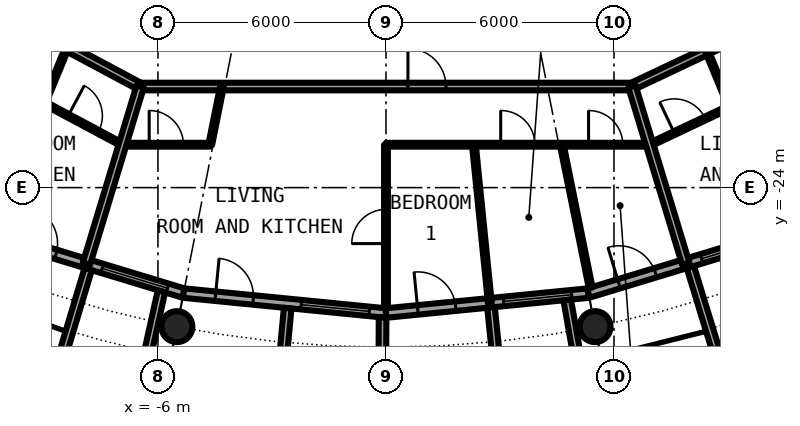
"""IFC4 building model, lengths in metres.
Left out: names, types, materials, properties, quantities, classifications, styles, units other than length and angle.
Written with IfcOpenShell. Run it as: python <this file> out.ifc"""

import sys

from ifc_helpers import new_model, si_unit, direction, frame, frame_2d, origin, origin_2d, place, context, subcontext, project, spatial, rectangle, circle, hollow_circle, extrude, element, fill, save


model = new_model("IFC4")
c1 = context("Model", 3, precision=1e-05, world=origin(), true_north=direction((0.0, 1.0)))
c2 = subcontext(c1, "Body", "Model", "MODEL_VIEW")
j1 = project(units=[si_unit("LENGTHUNIT", "METRE"), si_unit("PLANEANGLEUNIT", "RADIAN")], contexts=[c1])
p1 = place(None, origin())
s1 = spatial("IfcSite", under=j1, at=p1, CompositionType="ELEMENT")
p2 = place(p1, origin())
s2 = spatial("IfcBuilding", under=s1, at=p2, CompositionType="ELEMENT")
p3 = place(p2, frame((0.0, 0.0, 218.8)))
s3 = spatial("IfcBuildingStorey", under=s2, at=p3, CompositionType="ELEMENT", Elevation=218.8)
for number, where, z_axis, x_axis in (
    (1, (-5.501, -27.658, 0.0), (0.0, 0.0, 1.0), (1.0, 0.0, 0.0)),
    (2, (5.501, -27.658, 0.0), (0.0, 0.0, 1.0), (1.0, 0.0, 0.0)),
):
    element("IfcColumn", number, at=place(p3, frame(where, z_axis=z_axis, x_axis=x_axis)), inside=s3, PredefinedType="COLUMN", context=c2, shape_type="SweptSolid", body=[
        extrude(hollow_circle(Radius=0.406, WallThickness=0.03, at=origin_2d()), origin(), (0.0, 0.0, 1.0), 3.05),
    ])
p4 = place(p3, frame((-10.447, -25.222, 0.0), z_axis=(0.0, 0.0, 1.0), x_axis=(0.956965678721, -0.290201119486, 0.0)))
e3 = element("IfcWall", 3, at=p4, inside=s3, PredefinedType="SOLIDWALL", context=c2, shape_type="SweptSolid", body=[
    extrude(rectangle(XDim=5.351, YDim=0.25, at=frame_2d((2.676, 0.0))), origin(), (0.0, 0.0, 1.0), 2.65),
])
p5 = place(p4, frame((0.841, 0.0, 0.0)))
e4 = element("IfcOpeningElement", 4, at=p5, cuts=e3, PredefinedType="OPENING", context=c2, shape_type="SweptSolid", body=[
    extrude(rectangle(XDim=1.0, YDim=2.2, at=frame_2d((0.5, 1.1))), frame((0.0, 0.135, 0.0), z_axis=(0.0, -1.0, 0.0), x_axis=(1.0, 0.0, 0.0)), (0.0, 0.0, 1.0), 0.27),
])
p6 = place(p4, frame((3.111, 0.0, 0.3)))
e5 = element("IfcOpeningElement", 5, at=p6, cuts=e3, PredefinedType="OPENING", context=c2, shape_type="SweptSolid", body=[
    extrude(rectangle(XDim=1.8, YDim=2.1, at=frame_2d((0.9, 1.05))), frame((0.0, 0.135, 0.0), z_axis=(0.0, -1.0, 0.0), x_axis=(1.0, 0.0, 0.0)), (0.0, 0.0, 1.0), 0.27),
])
p7 = place(p3, frame((-7.837, -26.144, -0.03), z_axis=(0.0, 0.0, 1.0), x_axis=(-0.287064767992, -0.957911174889, 0.0)))
e6 = element("IfcWall", 6, at=p7, inside=s3, PredefinedType="SOLIDWALL", context=c2, shape_type="SweptSolid", body=[
    extrude(rectangle(XDim=3.006, YDim=0.2, at=frame_2d((1.503, 0.0))), origin(), (0.0, 0.0, 1.0), 2.68),
])
p8 = place(p3, frame((-5.909, -26.729, -0.03), z_axis=(0.0, 0.0, 1.0), x_axis=(-0.216409053917, -0.976302781612, 0.0)))
e7 = element("IfcWall", 7, at=p8, inside=s3, PredefinedType="SOLIDWALL", context=c2, shape_type="SweptSolid", body=[
    extrude(rectangle(XDim=2.925, YDim=0.2, at=frame_2d((1.463, 0.0))), origin(), (0.0, 0.0, 1.0), 2.68),
])
p9 = place(p3, frame((-5.326, -26.775, 0.0), z_axis=(0.0, 0.0, 1.0), x_axis=(0.995173996315, -0.098126026407, 0.0)))
e8 = element("IfcWall", 8, at=p9, inside=s3, PredefinedType="SOLIDWALL", context=c2, shape_type="SweptSolid", body=[
    extrude(rectangle(XDim=5.352, YDim=0.25, at=frame_2d((2.676, 0.0))), origin(), (0.0, 0.0, 1.0), 2.65),
])
p10 = place(p9, frame((0.841, 0.0, 0.0)))
e9 = element("IfcOpeningElement", 9, at=p10, cuts=e8, PredefinedType="OPENING", context=c2, shape_type="SweptSolid", body=[
    extrude(rectangle(XDim=1.0, YDim=2.2, at=frame_2d((0.5, 1.1))), frame((0.0, 0.135, 0.0), z_axis=(0.0, -1.0, 0.0), x_axis=(1.0, 0.0, 0.0)), (0.0, 0.0, 1.0), 0.27),
])
p11 = place(p9, frame((3.111, 0.0, 0.3)))
e10 = element("IfcOpeningElement", 10, at=p11, cuts=e8, PredefinedType="OPENING", context=c2, shape_type="SweptSolid", body=[
    extrude(rectangle(XDim=1.8, YDim=2.1, at=frame_2d((0.9, 1.05))), frame((0.0, 0.135, 0.0), z_axis=(0.0, -1.0, 0.0), x_axis=(1.0, 0.0, 0.0)), (0.0, 0.0, 1.0), 0.27),
])
p12 = place(p3, frame((-2.586, -27.171, -0.03), z_axis=(0.0, 0.0, 1.0), x_axis=(-0.094548432284, -0.995520262954, 0.0)))
e11 = element("IfcWall", 11, at=p12, inside=s3, PredefinedType="SOLIDWALL", context=c2, shape_type="SweptSolid", body=[
    extrude(rectangle(XDim=3.006, YDim=0.2, at=frame_2d((1.503, 0.0))), origin(), (0.0, 0.0, 1.0), 2.68),
])
p13 = place(p3, frame((-0.09, -27.417, -0.03), z_axis=(0.0, 0.0, 1.0), x_axis=(-0.00347308367, -0.999993968827, 0.0)))
e12 = element("IfcWall", 12, at=p13, inside=s3, PredefinedType="SOLIDWALL", context=c2, shape_type="SweptSolid", body=[
    extrude(rectangle(XDim=2.882, YDim=0.2, at=frame_2d((1.441, 0.0))), origin(), (0.0, 0.0, 1.0), 2.68),
])
p14 = place(p3, frame((0.0, -27.3, 0.0), z_axis=(0.0, 0.0, 1.0), x_axis=(0.995173996315, 0.098126026407, 0.0)))
e13 = element("IfcWall", 13, at=p14, inside=s3, PredefinedType="SOLIDWALL", context=c2, shape_type="SweptSolid", body=[
    extrude(rectangle(XDim=5.352, YDim=0.25, at=frame_2d((2.676, 0.0))), origin(), (0.0, 0.0, 1.0), 2.65),
])
p15 = place(p14, frame((0.841, 0.0, 0.0)))
e14 = element("IfcOpeningElement", 14, at=p15, cuts=e13, PredefinedType="OPENING", context=c2, shape_type="SweptSolid", body=[
    extrude(rectangle(XDim=1.0, YDim=2.2, at=frame_2d((0.5, 1.1))), frame((0.0, 0.135, 0.0), z_axis=(0.0, -1.0, 0.0), x_axis=(1.0, 0.0, 0.0)), (0.0, 0.0, 1.0), 0.27),
])
p16 = place(p14, frame((3.111, 0.0, 0.3)))
e15 = element("IfcOpeningElement", 15, at=p16, cuts=e13, PredefinedType="OPENING", context=c2, shape_type="SweptSolid", body=[
    extrude(rectangle(XDim=1.8, YDim=2.1, at=frame_2d((0.9, 1.05))), frame((0.0, 0.135, 0.0), z_axis=(0.0, -1.0, 0.0), x_axis=(1.0, 0.0, 0.0)), (0.0, 0.0, 1.0), 0.27),
])
p17 = place(p3, frame((2.764, -27.153, -0.03), z_axis=(0.0, 0.0, 1.0), x_axis=(0.101505487237, -0.994834979311, 0.0)))
e16 = element("IfcWall", 16, at=p17, inside=s3, PredefinedType="SOLIDWALL", context=c2, shape_type="SweptSolid", body=[
    extrude(rectangle(XDim=3.007, YDim=0.2, at=frame_2d((1.503, 0.0))), origin(), (0.0, 0.0, 1.0), 2.68),
])
p18 = place(p3, frame((4.769, -26.956, -0.03), z_axis=(0.0, 0.0, 1.0), x_axis=(0.174056778901, -0.984735618183, 0.0)))
e17 = element("IfcWall", 17, at=p18, inside=s3, PredefinedType="SOLIDWALL", context=c2, shape_type="SweptSolid", body=[
    extrude(rectangle(XDim=2.925, YDim=0.2, at=frame_2d((1.462, 0.0))), origin(), (0.0, 0.0, 1.0), 2.68),
])
p19 = place(p3, frame((5.326, -26.775, 0.0), z_axis=(0.0, 0.0, 1.0), x_axis=(0.956965678721, 0.290201119486, 0.0)))
e18 = element("IfcWall", 18, at=p19, inside=s3, PredefinedType="SOLIDWALL", context=c2, shape_type="SweptSolid", body=[
    extrude(rectangle(XDim=5.351, YDim=0.25, at=frame_2d((2.676, 0.0))), origin(), (0.0, 0.0, 1.0), 2.65),
])
p20 = place(p19, frame((0.841, 0.0, 0.0)))
e19 = element("IfcOpeningElement", 19, at=p20, cuts=e18, PredefinedType="OPENING", context=c2, shape_type="SweptSolid", body=[
    extrude(rectangle(XDim=1.0, YDim=2.2, at=frame_2d((0.5, 1.1))), frame((0.0, 0.135, 0.0), z_axis=(0.0, -1.0, 0.0), x_axis=(1.0, 0.0, 0.0)), (0.0, 0.0, 1.0), 0.27),
])
p21 = place(p19, frame((3.111, 0.0, 0.3)))
e20 = element("IfcOpeningElement", 20, at=p21, cuts=e18, PredefinedType="OPENING", context=c2, shape_type="SweptSolid", body=[
    extrude(rectangle(XDim=1.8, YDim=2.1, at=frame_2d((0.9, 1.05))), frame((0.0, 0.135, 0.0), z_axis=(0.0, -1.0, 0.0), x_axis=(1.0, 0.0, 0.0)), (0.0, 0.0, 1.0), 0.27),
])
p22 = place(p3, frame((8.82, -29.093, -0.03), z_axis=(0.0, 0.0, 1.0), x_axis=(0.941461077774, 0.337121697664, 0.0)))
e21 = element("IfcWall", 21, at=p22, inside=s3, PredefinedType="SOLIDWALL", context=c2, shape_type="SweptSolid", body=[
    extrude(rectangle(XDim=2.993, YDim=0.2, at=frame_2d((1.497, 0.0))), origin(), (0.0, 0.0, 1.0), 2.68),
])
p23 = place(p22, frame((0.457, 0.0, 0.33)))
e22 = element("IfcOpeningElement", 22, at=p23, cuts=e21, PredefinedType="OPENING", context=c2, shape_type="SweptSolid", body=[
    extrude(circle(Radius=1.04, at=frame_2d((1.04, 1.04))), frame((0.0, 0.11, 0.0), z_axis=(0.0, -1.0, 0.0), x_axis=(1.0, 0.0, 0.0)), (0.0, 0.0, 1.0), 0.22),
])
p24 = place(p3, frame((8.009, -26.092, -0.03), z_axis=(0.0, 0.0, 1.0), x_axis=(0.293406695073, -0.955987715029, 0.0)))
e23 = element("IfcWall", 23, at=p24, inside=s3, PredefinedType="SOLIDWALL", context=c2, shape_type="SweptSolid", body=[
    extrude(rectangle(XDim=3.006, YDim=0.2, at=frame_2d((1.503, 0.0))), origin(), (0.0, 0.0, 1.0), 2.68),
])
p25 = place(p3, frame((6.939, -22.872, 0.0), z_axis=(0.0, 0.0, 1.0), x_axis=(0.903888765148, 0.427767577359, 0.0)))
e24 = element("IfcWall", 24, at=p25, inside=s3, PredefinedType="PARTITIONING", context=c2, shape_type="SweptSolid", body=[
    extrude(rectangle(XDim=2.338, YDim=0.1, at=frame_2d((1.169, 0.0))), origin(), (0.0, 0.0, 1.0), 2.65),
])
p26 = place(p25, frame((0.718, 0.0, 0.0)))
e25 = element("IfcOpeningElement", 25, at=p26, cuts=e24, PredefinedType="OPENING", context=c2, shape_type="SweptSolid", body=[
    extrude(rectangle(XDim=0.9, YDim=2.3, at=frame_2d((0.45, 1.15))), frame((0.0, 0.06, 0.0), z_axis=(0.0, -1.0, 0.0), x_axis=(1.0, 0.0, 0.0)), (0.0, 0.0, 1.0), 0.12),
])
p27 = place(p3, frame((-8.994, -21.772, 0.0), z_axis=(0.0, 0.0, 1.0), x_axis=(0.881882873346, -0.471468554305, 0.0)))
e26 = element("IfcWall", 26, at=p27, inside=s3, PredefinedType="PARTITIONING", context=c2, shape_type="SweptSolid", body=[
    extrude(rectangle(XDim=2.331, YDim=0.1, at=frame_2d((1.166, 0.0))), origin(), (0.0, 0.0, 1.0), 2.65),
])
p28 = place(p27, frame((0.716, 0.0, 0.0)))
e27 = element("IfcOpeningElement", 27, at=p28, cuts=e26, PredefinedType="OPENING", context=c2, shape_type="SweptSolid", body=[
    extrude(rectangle(XDim=0.9, YDim=2.3, at=frame_2d((0.45, 1.15))), frame((0.0, 0.06, 0.0), z_axis=(0.0, -1.0, 0.0), x_axis=(1.0, 0.0, 0.0)), (0.0, 0.0, 1.0), 0.12),
])
p29 = place(p3, frame((-6.938, -22.871, 0.0), z_axis=(0.0, 0.0, 1.0), x_axis=(1.0, 0.0, 0.0)))
e28 = element("IfcWall", 28, at=p29, inside=s3, PredefinedType="PARTITIONING", context=c2, shape_type="SweptSolid", body=[
    extrude(rectangle(XDim=2.313, YDim=0.1, at=frame_2d((1.156, 0.0))), origin(), (0.0, 0.0, 1.0), 2.65),
])
p30 = place(p29, frame((0.707, 0.0, 0.0)))
e29 = element("IfcOpeningElement", 29, at=p30, cuts=e28, PredefinedType="OPENING", context=c2, shape_type="SweptSolid", body=[
    extrude(rectangle(XDim=0.9, YDim=2.3, at=frame_2d((0.45, 1.15))), frame((0.0, 0.06, 0.0), z_axis=(0.0, -1.0, 0.0), x_axis=(1.0, 0.0, 0.0)), (0.0, 0.0, 1.0), 0.12),
])
p31 = place(p3, frame((0.0, -22.871, 0.0), z_axis=(0.0, 0.0, 1.0), x_axis=(1.0, 0.0, 0.0)))
e30 = element("IfcWall", 30, at=p31, inside=s3, PredefinedType="PARTITIONING", context=c2, shape_type="SweptSolid", body=[
    extrude(rectangle(XDim=6.938, YDim=0.1, at=frame_2d((3.469, 0.0))), origin(), (0.0, 0.0, 1.0), 2.65),
])
p32 = place(p31, frame((3.019, 0.0, 0.0)))
e31 = element("IfcOpeningElement", 31, at=p32, cuts=e30, PredefinedType="OPENING", context=c2, shape_type="SweptSolid", body=[
    extrude(rectangle(XDim=0.9, YDim=2.3, at=frame_2d((0.45, 1.15))), frame((0.0, 0.06, 0.0), z_axis=(0.0, -1.0, 0.0), x_axis=(1.0, 0.0, 0.0)), (0.0, 0.0, 1.0), 0.12),
])
p33 = place(p31, frame((5.331, 0.0, 0.0)))
e32 = element("IfcOpeningElement", 32, at=p33, cuts=e30, PredefinedType="OPENING", context=c2, shape_type="SweptSolid", body=[
    extrude(rectangle(XDim=0.9, YDim=2.3, at=frame_2d((0.45, 1.15))), frame((0.0, 0.06, 0.0), z_axis=(0.0, -1.0, 0.0), x_axis=(1.0, 0.0, 0.0)), (0.0, 0.0, 1.0), 0.12),
])
p34 = place(p3, frame((6.469, -21.342, 0.0), z_axis=(0.0, 0.0, 1.0), x_axis=(0.90398136628, 0.427571852931, 0.0)))
e33 = element("IfcWall", 33, at=p34, inside=s3, PredefinedType="PARTITIONING", context=c2, shape_type="SweptSolid", body=[
    extrude(rectangle(XDim=6.549, YDim=0.2, at=frame_2d((3.274, 0.0))), origin(), (0.0, 0.0, 1.0), 2.65),
])
p35 = place(p34, frame((3.867, 0.0, 0.0)))
e34 = element("IfcOpeningElement", 34, at=p35, cuts=e33, PredefinedType="OPENING", context=c2, shape_type="SweptSolid", body=[
    extrude(rectangle(XDim=1.0, YDim=2.3, at=frame_2d((0.5, 1.15))), frame((0.0, 0.11, 0.0), z_axis=(0.0, -1.0, 0.0), x_axis=(1.0, 0.0, 0.0)), (0.0, 0.0, 1.0), 0.22),
])
p36 = place(p3, frame((-14.147, -17.238, 0.0), z_axis=(0.0, 0.0, 1.0), x_axis=(0.881941116964, -0.471359593312, 0.0)))
e35 = element("IfcWall", 35, at=p36, inside=s3, PredefinedType="PARTITIONING", context=c2, shape_type="SweptSolid", body=[
    extrude(rectangle(XDim=8.705, YDim=0.2, at=frame_2d((4.352, 0.0))), origin(), (0.0, 0.0, 1.0), 2.65),
])
p37 = place(p36, frame((2.763, 0.0, 0.0)))
e36 = element("IfcOpeningElement", 36, at=p37, cuts=e35, PredefinedType="OPENING", context=c2, shape_type="SweptSolid", body=[
    extrude(rectangle(XDim=1.0, YDim=2.3, at=frame_2d((0.5, 1.15))), frame((0.0, 0.11, 0.0), z_axis=(0.0, -1.0, 0.0), x_axis=(1.0, 0.0, 0.0)), (0.0, 0.0, 1.0), 0.22),
])
p38 = place(p3, frame((-6.473, -21.34, 0.0), z_axis=(0.0, 0.0, 1.0), x_axis=(1.0, 0.0, 0.0)))
e37 = element("IfcWall", 37, at=p38, inside=s3, PredefinedType="PARTITIONING", context=c2, shape_type="SweptSolid", body=[
    extrude(rectangle(XDim=12.946, YDim=0.2, at=frame_2d((6.473, 0.0))), origin(), (0.0, 0.0, 1.0), 2.65),
])
p39 = place(p38, frame((7.051, 0.0, 0.0)))
e38 = element("IfcOpeningElement", 38, at=p39, cuts=e37, PredefinedType="OPENING", context=c2, shape_type="SweptSolid", body=[
    extrude(rectangle(XDim=1.0, YDim=2.3, at=frame_2d((0.5, 1.15))), frame((0.0, 0.11, 0.0), z_axis=(0.0, -1.0, 0.0), x_axis=(1.0, 0.0, 0.0)), (0.0, 0.0, 1.0), 0.22),
])
p40 = place(p3, frame((6.473, -21.34, 0.0), z_axis=(0.0, 0.0, 1.0), x_axis=(0.290705166682, -0.956812680761, 0.0)))
e39 = element("IfcWall", 39, at=p40, inside=s3, PredefinedType="PARTITIONING", context=c2, shape_type="SweptSolid", body=[
    extrude(rectangle(XDim=4.874, YDim=0.2, at=frame_2d((2.437, 0.0))), origin(), (0.0, 0.0, 1.0), 2.65),
])
p41 = place(p3, frame((-8.994, -21.772, 0.0), z_axis=(0.0, 0.0, 1.0), x_axis=(0.381535938362, 0.924354005638, 0.0)))
e40 = element("IfcWall", 40, at=p41, inside=s3, PredefinedType="PARTITIONING", context=c2, shape_type="SweptSolid", body=[
    extrude(rectangle(XDim=1.577, YDim=0.1, at=frame_2d((0.789, 0.0))), origin(), (0.0, 0.0, 1.0), 2.65),
])
p42 = place(p3, frame((-7.883, -26.006, 0.0), z_axis=(0.0, 0.0, 1.0), x_axis=(0.290085236897, 0.957000812609, 0.0)))
e41 = element("IfcWall", 41, at=p42, inside=s3, PredefinedType="PARTITIONING", context=c2, shape_type="SweptSolid", body=[
    extrude(rectangle(XDim=4.875, YDim=0.2, at=frame_2d((2.438, 0.0))), origin(), (0.0, 0.0, 1.0), 2.65),
])
p43 = place(p3, frame((0.0, -27.175, 0.0), z_axis=(0.0, 0.0, 1.0), x_axis=(0.0, 1.0, 0.0)))
e42 = element("IfcWall", 42, at=p43, inside=s3, PredefinedType="PARTITIONING", context=c2, shape_type="SweptSolid", body=[
    extrude(rectangle(XDim=4.304, YDim=0.1, at=frame_2d((2.152, 0.0))), origin(), (0.0, 0.0, 1.0), 2.65),
])
p44 = place(p43, frame((1.702, 0.0, 0.0)))
e43 = element("IfcOpeningElement", 43, at=p44, cuts=e42, PredefinedType="OPENING", context=c2, shape_type="SweptSolid", body=[
    extrude(rectangle(XDim=0.9, YDim=2.3, at=frame_2d((0.45, 1.15))), frame((0.0, 0.06, 0.0), z_axis=(0.0, -1.0, 0.0), x_axis=(1.0, 0.0, 0.0)), (0.0, 0.0, 1.0), 0.12),
])
p45 = place(p3, frame((2.313, -22.871, 0.0), z_axis=(0.0, 0.0, 1.0), x_axis=(0.100519694011, -0.994935068794, 0.0)))
e44 = element("IfcWall", 44, at=p45, inside=s3, PredefinedType="PARTITIONING", context=c2, shape_type="SweptSolid", body=[
    extrude(rectangle(XDim=4.187, YDim=0.1, at=frame_2d((2.094, 0.0))), origin(), (0.0, 0.0, 1.0), 2.65),
])
p46 = place(p3, frame((4.625, -22.871, 0.0), z_axis=(0.0, 0.0, 1.0), x_axis=(0.198364595596, -0.980128301405, 0.0)))
e45 = element("IfcWall", 45, at=p46, inside=s3, PredefinedType="PARTITIONING", context=c2, shape_type="SweptSolid", body=[
    extrude(rectangle(XDim=3.841, YDim=0.1, at=frame_2d((1.921, 0.0))), origin(), (0.0, 0.0, 1.0), 2.65),
])
p47 = place(p3, frame((8.445, -20.407, 0.0), z_axis=(0.0, 0.0, 1.0), x_axis=(0.38241529907, -0.923990551379, 0.0)))
e46 = element("IfcWall", 46, at=p47, inside=s3, PredefinedType="PARTITIONING", context=c2, shape_type="SweptSolid", body=[
    extrude(rectangle(XDim=1.584, YDim=0.1, at=frame_2d((0.792, 0.0))), origin(), (0.0, 0.0, 1.0), 2.65),
])
p48 = place(p3, frame((-4.625, -22.871, 0.0), z_axis=(0.0, 0.0, 1.0), x_axis=(0.19788933956, 0.98022436681, 0.0)))
e47 = element("IfcWall", 47, at=p48, inside=s3, PredefinedType="PARTITIONING", context=c2, shape_type="SweptSolid", body=[
    extrude(rectangle(XDim=1.562, YDim=0.1, at=frame_2d((0.781, 0.0))), origin(), (0.0, 0.0, 1.0), 2.65),
])
p49 = place(p5, origin())
e48 = element("IfcDoor", 48, at=p49, inside=s3, OperationType="SINGLE_SWING_LEFT", PredefinedType="DOOR", context=c2, shape_type="SweptSolid", body=[
    extrude(rectangle(XDim=1.0, YDim=2.2, at=frame_2d((0.5, 1.1))), frame((0.0, 0.025, 0.0), z_axis=(0.0, -1.0, 0.0), x_axis=(1.0, 0.0, 0.0)), (0.0, 0.0, 1.0), 0.05),
])
fill(e4, e48)
p50 = place(p6, origin())
e49 = element("IfcWindow", 49, at=p50, inside=s3, PartitioningType="SINGLE_PANEL", PredefinedType="WINDOW", context=c2, shape_type="SweptSolid", body=[
    extrude(rectangle(XDim=1.8, YDim=2.1, at=frame_2d((0.9, 1.05))), frame((0.0, 0.03, 0.0), z_axis=(0.0, -1.0, 0.0), x_axis=(1.0, 0.0, 0.0)), (0.0, 0.0, 1.0), 0.06),
])
fill(e5, e49)
p51 = place(p10, origin())
e50 = element("IfcDoor", 50, at=p51, inside=s3, OperationType="SINGLE_SWING_LEFT", PredefinedType="DOOR", context=c2, shape_type="SweptSolid", body=[
    extrude(rectangle(XDim=1.0, YDim=2.2, at=frame_2d((0.5, 1.1))), frame((0.0, 0.025, 0.0), z_axis=(0.0, -1.0, 0.0), x_axis=(1.0, 0.0, 0.0)), (0.0, 0.0, 1.0), 0.05),
])
fill(e9, e50)
p52 = place(p11, origin())
e51 = element("IfcWindow", 51, at=p52, inside=s3, PartitioningType="SINGLE_PANEL", PredefinedType="WINDOW", context=c2, shape_type="SweptSolid", body=[
    extrude(rectangle(XDim=1.8, YDim=2.1, at=frame_2d((0.9, 1.05))), frame((0.0, 0.03, 0.0), z_axis=(0.0, -1.0, 0.0), x_axis=(1.0, 0.0, 0.0)), (0.0, 0.0, 1.0), 0.06),
])
fill(e10, e51)
p53 = place(p15, origin())
e52 = element("IfcDoor", 52, at=p53, inside=s3, OperationType="SINGLE_SWING_LEFT", PredefinedType="DOOR", context=c2, shape_type="SweptSolid", body=[
    extrude(rectangle(XDim=1.0, YDim=2.2, at=frame_2d((0.5, 1.1))), frame((0.0, 0.025, 0.0), z_axis=(0.0, -1.0, 0.0), x_axis=(1.0, 0.0, 0.0)), (0.0, 0.0, 1.0), 0.05),
])
fill(e14, e52)
p54 = place(p16, origin())
e53 = element("IfcWindow", 53, at=p54, inside=s3, PartitioningType="SINGLE_PANEL", PredefinedType="WINDOW", context=c2, shape_type="SweptSolid", body=[
    extrude(rectangle(XDim=1.8, YDim=2.1, at=frame_2d((0.9, 1.05))), frame((0.0, 0.03, 0.0), z_axis=(0.0, -1.0, 0.0), x_axis=(1.0, 0.0, 0.0)), (0.0, 0.0, 1.0), 0.06),
])
fill(e15, e53)
p55 = place(p20, origin())
e54 = element("IfcDoor", 54, at=p55, inside=s3, OperationType="SINGLE_SWING_LEFT", PredefinedType="DOOR", context=c2, shape_type="SweptSolid", body=[
    extrude(rectangle(XDim=1.0, YDim=2.2, at=frame_2d((0.5, 1.1))), frame((0.0, 0.025, 0.0), z_axis=(0.0, -1.0, 0.0), x_axis=(1.0, 0.0, 0.0)), (0.0, 0.0, 1.0), 0.05),
])
fill(e19, e54)
p56 = place(p21, origin())
e55 = element("IfcWindow", 55, at=p56, inside=s3, PartitioningType="SINGLE_PANEL", PredefinedType="WINDOW", context=c2, shape_type="SweptSolid", body=[
    extrude(rectangle(XDim=1.8, YDim=2.1, at=frame_2d((0.9, 1.05))), frame((0.0, 0.03, 0.0), z_axis=(0.0, -1.0, 0.0), x_axis=(1.0, 0.0, 0.0)), (0.0, 0.0, 1.0), 0.06),
])
fill(e20, e55)
p57 = place(p28, origin())
e56 = element("IfcDoor", 56, at=p57, inside=s3, OperationType="SINGLE_SWING_RIGHT", PredefinedType="DOOR", context=c2, shape_type="SweptSolid", body=[
    extrude(rectangle(XDim=0.9, YDim=2.3, at=frame_2d((0.45, 1.15))), frame((0.0, 0.025, 0.0), z_axis=(0.0, -1.0, 0.0), x_axis=(1.0, 0.0, 0.0)), (0.0, 0.0, 1.0), 0.05),
])
fill(e27, e56)
p58 = place(p39, origin())
e57 = element("IfcDoor", 57, at=p58, inside=s3, OperationType="SINGLE_SWING_RIGHT", PredefinedType="DOOR", context=c2, shape_type="SweptSolid", body=[
    extrude(rectangle(XDim=1.0, YDim=2.3, at=frame_2d((0.5, 1.15))), frame((0.0, 0.025, 0.0), z_axis=(0.0, -1.0, 0.0), x_axis=(1.0, 0.0, 0.0)), (0.0, 0.0, 1.0), 0.05),
])
fill(e38, e57)
p59 = place(p30, origin())
e58 = element("IfcDoor", 58, at=p59, inside=s3, OperationType="SINGLE_SWING_RIGHT", PredefinedType="DOOR", context=c2, shape_type="SweptSolid", body=[
    extrude(rectangle(XDim=0.9, YDim=2.3, at=frame_2d((0.45, 1.15))), frame((0.0, 0.025, 0.0), z_axis=(0.0, -1.0, 0.0), x_axis=(1.0, 0.0, 0.0)), (0.0, 0.0, 1.0), 0.05),
])
fill(e29, e58)
p60 = place(p44, origin())
e59 = element("IfcDoor", 59, at=p60, inside=s3, OperationType="SINGLE_SWING_RIGHT", PredefinedType="DOOR", context=c2, shape_type="SweptSolid", body=[
    extrude(rectangle(XDim=0.9, YDim=2.3, at=frame_2d((0.45, 1.15))), frame((0.0, 0.025, 0.0), z_axis=(0.0, -1.0, 0.0), x_axis=(1.0, 0.0, 0.0)), (0.0, 0.0, 1.0), 0.05),
])
fill(e43, e59)
p61 = place(p32, origin())
e60 = element("IfcDoor", 60, at=p61, inside=s3, OperationType="SINGLE_SWING_RIGHT", PredefinedType="DOOR", context=c2, shape_type="SweptSolid", body=[
    extrude(rectangle(XDim=0.9, YDim=2.3, at=frame_2d((0.45, 1.15))), frame((0.0, 0.025, 0.0), z_axis=(0.0, -1.0, 0.0), x_axis=(1.0, 0.0, 0.0)), (0.0, 0.0, 1.0), 0.05),
])
fill(e31, e60)
p62 = place(p33, origin())
e61 = element("IfcDoor", 61, at=p62, inside=s3, OperationType="SINGLE_SWING_RIGHT", PredefinedType="DOOR", context=c2, shape_type="SweptSolid", body=[
    extrude(rectangle(XDim=0.9, YDim=2.3, at=frame_2d((0.45, 1.15))), frame((0.0, 0.025, 0.0), z_axis=(0.0, -1.0, 0.0), x_axis=(1.0, 0.0, 0.0)), (0.0, 0.0, 1.0), 0.05),
])
fill(e32, e61)
p63 = place(p26, origin())
e62 = element("IfcDoor", 62, at=p63, inside=s3, OperationType="SINGLE_SWING_LEFT", PredefinedType="DOOR", context=c2, shape_type="SweptSolid", body=[
    extrude(rectangle(XDim=0.9, YDim=2.3, at=frame_2d((0.45, 1.15))), frame((0.0, 0.025, 0.0), z_axis=(0.0, -1.0, 0.0), x_axis=(1.0, 0.0, 0.0)), (0.0, 0.0, 1.0), 0.05),
])
fill(e25, e62)
save(model, sys.argv[1])
